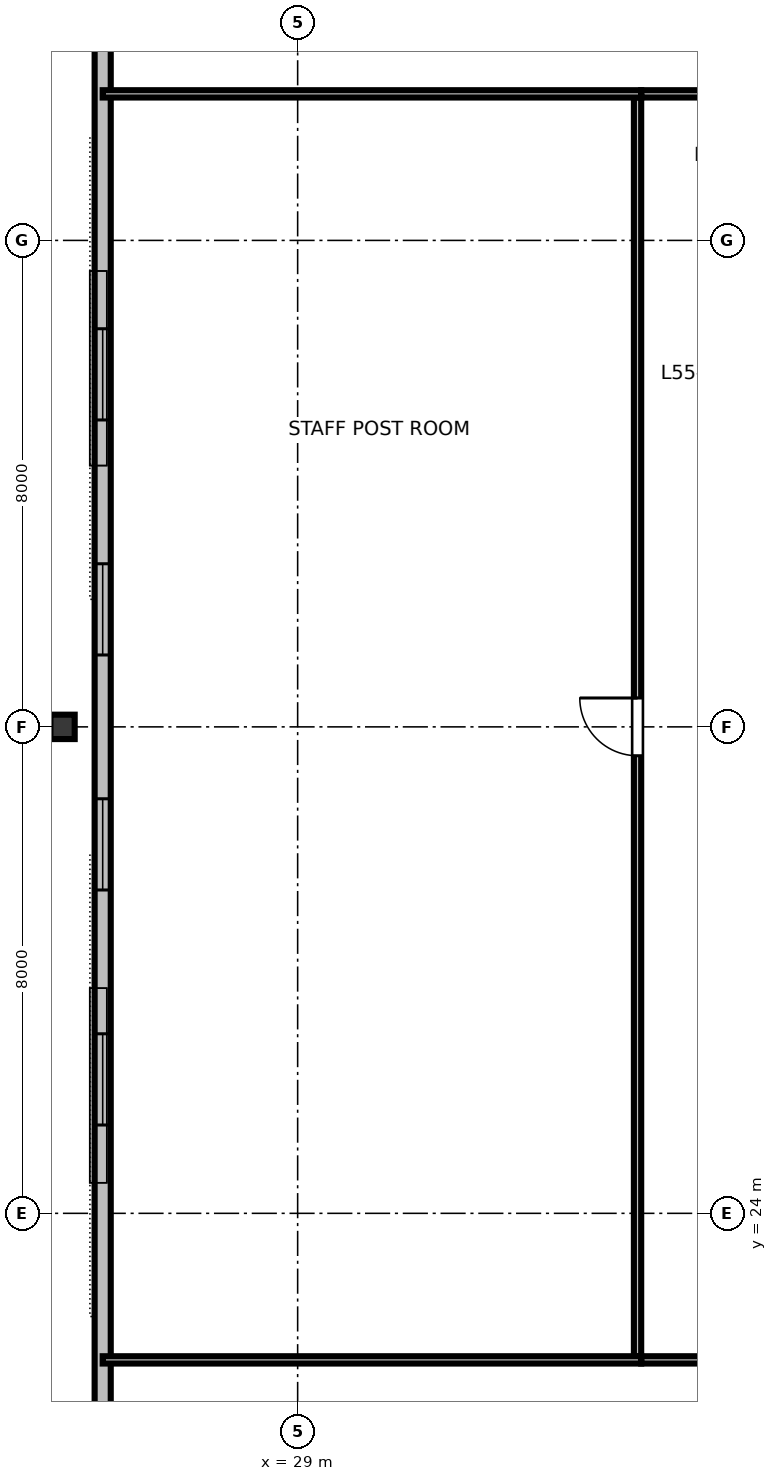
"""IFC4 building model, lengths in metres.
Left out: names, types, materials, properties, quantities, classifications, styles, units other than length and angle.
Written with IfcOpenShell. Run it as: python <this file> out.ifc"""

import sys

from ifc_helpers import new_model, si_unit, direction, frame, frame_2d, origin, origin_2d, place, context, subcontext, project, spatial, rectangle, i_section, extrude, element, fill, save


model = new_model("IFC4")
c1 = context("Model", 3, precision=1e-05, world=origin(), true_north=direction((0.0, 1.0)))
c2 = subcontext(c1, "Body", "Model", "MODEL_VIEW")
j1 = project(units=[si_unit("LENGTHUNIT", "METRE"), si_unit("PLANEANGLEUNIT", "RADIAN")], contexts=[c1])
p1 = place(None, origin())
s1 = spatial("IfcSite", under=j1, at=p1, CompositionType="ELEMENT")
p2 = place(p1, origin())
s2 = spatial("IfcBuilding", under=s1, at=p2, CompositionType="ELEMENT")
p3 = place(p2, frame((0.0, 0.0, 209.4)))
s3 = spatial("IfcBuildingStorey", under=s2, at=p3, CompositionType="ELEMENT", Elevation=209.4)
p4 = place(p3, frame((25.134, 32.0, 0.0), z_axis=(0.0, 0.0, 1.0), x_axis=(0.0, 1.0, 0.0)))
e1 = element("IfcColumn", 1, at=p4, inside=s3, PredefinedType="COLUMN", context=c2, shape_type="SweptSolid", body=[
    extrude(i_section(OverallWidth=0.401, OverallDepth=0.399, WebThickness=0.025, FlangeThickness=0.04, FilletRadius=0.025, at=origin_2d()), origin(), (0.0, 0.0, 1.0), 3.373),
])
p5 = place(p3, frame((25.794, 44.695, 0.0), z_axis=(0.0, 0.0, 1.0), x_axis=(0.0, -1.0, 0.0)))
e2 = element("IfcWall", 2, at=p5, inside=s3, PredefinedType="STANDARD", context=c2, shape_type="SweptSolid", body=[
    extrude(rectangle(XDim=25.389, YDim=0.265, at=frame_2d((12.695, 0.0))), origin(), (0.0, 0.0, 1.0), 3.375),
])
p6 = place(p5, frame((6.147, 0.0, 0.85)))
e3 = element("IfcOpeningElement", 3, at=p6, cuts=e2, PredefinedType="OPENING", context=c2, shape_type="SweptSolid", body=[
    extrude(rectangle(XDim=1.5, YDim=1.85, at=frame_2d((0.75, 0.925))), frame((0.0, 0.142, 0.0), z_axis=(0.0, -1.0, 0.0), x_axis=(1.0, 0.0, 0.0)), (0.0, 0.0, 1.0), 0.285),
])
p7 = place(p5, frame((10.012, 0.0, 0.85)))
e4 = element("IfcOpeningElement", 4, at=p7, cuts=e2, PredefinedType="OPENING", context=c2, shape_type="SweptSolid", body=[
    extrude(rectangle(XDim=1.5, YDim=1.85, at=frame_2d((0.75, 0.925))), frame((0.0, 0.142, 0.0), z_axis=(0.0, -1.0, 0.0), x_axis=(1.0, 0.0, 0.0)), (0.0, 0.0, 1.0), 0.285),
])
p8 = place(p5, frame((13.877, 0.0, 0.85)))
e5 = element("IfcOpeningElement", 5, at=p8, cuts=e2, PredefinedType="OPENING", context=c2, shape_type="SweptSolid", body=[
    extrude(rectangle(XDim=1.5, YDim=1.85, at=frame_2d((0.75, 0.925))), frame((0.0, 0.142, 0.0), z_axis=(0.0, -1.0, 0.0), x_axis=(1.0, 0.0, 0.0)), (0.0, 0.0, 1.0), 0.285),
])
p9 = place(p5, frame((17.742, 0.0, 0.85)))
e6 = element("IfcOpeningElement", 6, at=p9, cuts=e2, PredefinedType="OPENING", context=c2, shape_type="SweptSolid", body=[
    extrude(rectangle(XDim=1.5, YDim=1.85, at=frame_2d((0.75, 0.925))), frame((0.0, 0.142, 0.0), z_axis=(0.0, -1.0, 0.0), x_axis=(1.0, 0.0, 0.0)), (0.0, 0.0, 1.0), 0.285),
])
p10 = place(p3, frame((34.65, 21.59, 0.0), z_axis=(0.0, 0.0, 1.0), x_axis=(1.0, 0.0, 0.0)))
e7 = element("IfcWall", 7, at=p10, inside=s3, PredefinedType="PARTITIONING", context=c2, shape_type="SweptSolid", body=[
    extrude(rectangle(XDim=10.33, YDim=0.12, at=frame_2d((5.165, 0.0))), origin(), (0.0, 0.0, 1.0), 2.655),
])
p11 = place(p10, frame((2.69, 0.0, 0.0)))
e8 = element("IfcOpeningElement", 8, at=p11, cuts=e7, PredefinedType="OPENING", context=c2, shape_type="SweptSolid", body=[
    extrude(rectangle(XDim=0.95, YDim=2.15, at=frame_2d((0.475, 1.075))), frame((0.0, 0.07, 0.0), z_axis=(0.0, -1.0, 0.0), x_axis=(1.0, 0.0, 0.0)), (0.0, 0.0, 1.0), 0.14),
])
p12 = place(p10, frame((7.393, 0.0, 0.0)))
e9 = element("IfcOpeningElement", 9, at=p12, cuts=e7, PredefinedType="OPENING", context=c2, shape_type="SweptSolid", body=[
    extrude(rectangle(XDim=0.95, YDim=2.15, at=frame_2d((0.475, 1.075))), frame((0.0, 0.07, 0.0), z_axis=(0.0, -1.0, 0.0), x_axis=(1.0, 0.0, 0.0)), (0.0, 0.0, 1.0), 0.14),
])
p13 = place(p3, frame((34.65, 42.41, 0.0), z_axis=(0.0, 0.0, 1.0), x_axis=(1.0, 0.0, 0.0)))
e10 = element("IfcWall", 10, at=p13, inside=s3, PredefinedType="PARTITIONING", context=c2, shape_type="SweptSolid", body=[
    extrude(rectangle(XDim=10.33, YDim=0.12, at=frame_2d((5.165, 0.0))), origin(), (0.0, 0.0, 1.0), 2.655),
])
p14 = place(p13, frame((3.674, 0.0, 0.0)))
e11 = element("IfcOpeningElement", 11, at=p14, cuts=e10, PredefinedType="OPENING", context=c2, shape_type="SweptSolid", body=[
    extrude(rectangle(XDim=0.95, YDim=2.15, at=frame_2d((0.475, 1.075))), frame((0.0, 0.07, 0.0), z_axis=(0.0, -1.0, 0.0), x_axis=(1.0, 0.0, 0.0)), (0.0, 0.0, 1.0), 0.14),
])
p15 = place(p13, frame((8.769, 0.0, 0.0)))
e12 = element("IfcOpeningElement", 12, at=p15, cuts=e10, PredefinedType="OPENING", context=c2, shape_type="SweptSolid", body=[
    extrude(rectangle(XDim=0.95, YDim=2.15, at=frame_2d((0.475, 1.075))), frame((0.0, 0.07, 0.0), z_axis=(0.0, -1.0, 0.0), x_axis=(1.0, 0.0, 0.0)), (0.0, 0.0, 1.0), 0.14),
])
p16 = place(p3, frame((34.59, 21.65, 0.0), z_axis=(0.0, 0.0, 1.0), x_axis=(0.0, 1.0, 0.0)))
e13 = element("IfcWall", 13, at=p16, inside=s3, PredefinedType="PARTITIONING", context=c2, shape_type="SweptSolid", body=[
    extrude(rectangle(XDim=20.7, YDim=0.12, at=frame_2d((10.35, 0.0))), origin(), (0.0, 0.0, 1.0), 2.655),
])
p17 = place(p16, frame((9.875, 0.0, 0.0)))
e14 = element("IfcOpeningElement", 14, at=p17, cuts=e13, PredefinedType="OPENING", context=c2, shape_type="SweptSolid", body=[
    extrude(rectangle(XDim=0.95, YDim=2.15, at=frame_2d((0.475, 1.075))), frame((0.0, 0.07, 0.0), z_axis=(0.0, -1.0, 0.0), x_axis=(1.0, 0.0, 0.0)), (0.0, 0.0, 1.0), 0.14),
])
for number, where, z_axis, x_axis in (
    (15, (34.65, 21.59, 0.0), (0.0, 0.0, 1.0), (-1.0, 0.0, 0.0)),
    (16, (34.65, 42.41, 0.0), (0.0, 0.0, 1.0), (-1.0, 0.0, 0.0)),
):
    element("IfcWall", number, at=place(p3, frame(where, z_axis=z_axis, x_axis=x_axis)), inside=s3, PredefinedType="PARTITIONING", context=c2, shape_type="SweptSolid", body=[
        extrude(rectangle(XDim=8.856, YDim=0.12, at=frame_2d((4.428, 0.0))), origin(), (0.0, 0.0, 1.0), 2.655),
    ])
p18 = place(p6, origin())
e17 = element("IfcWindow", 17, at=p18, inside=s3, PartitioningType="SINGLE_PANEL", PredefinedType="WINDOW", context=c2, shape_type="SweptSolid", body=[
    extrude(rectangle(XDim=1.5, YDim=1.85, at=frame_2d((0.75, 0.925))), frame((0.0, 0.03, 0.0), z_axis=(0.0, -1.0, 0.0), x_axis=(1.0, 0.0, 0.0)), (0.0, 0.0, 1.0), 0.06),
])
fill(e3, e17)
p19 = place(p7, origin())
e18 = element("IfcWindow", 18, at=p19, inside=s3, PartitioningType="SINGLE_PANEL", PredefinedType="WINDOW", context=c2, shape_type="SweptSolid", body=[
    extrude(rectangle(XDim=1.5, YDim=1.85, at=frame_2d((0.75, 0.925))), frame((0.0, 0.03, 0.0), z_axis=(0.0, -1.0, 0.0), x_axis=(1.0, 0.0, 0.0)), (0.0, 0.0, 1.0), 0.06),
])
fill(e4, e18)
p20 = place(p8, origin())
e19 = element("IfcWindow", 19, at=p20, inside=s3, PartitioningType="SINGLE_PANEL", PredefinedType="WINDOW", context=c2, shape_type="SweptSolid", body=[
    extrude(rectangle(XDim=1.5, YDim=1.85, at=frame_2d((0.75, 0.925))), frame((0.0, 0.03, 0.0), z_axis=(0.0, -1.0, 0.0), x_axis=(1.0, 0.0, 0.0)), (0.0, 0.0, 1.0), 0.06),
])
fill(e5, e19)
p21 = place(p9, origin())
e20 = element("IfcWindow", 20, at=p21, inside=s3, PartitioningType="SINGLE_PANEL", PredefinedType="WINDOW", context=c2, shape_type="SweptSolid", body=[
    extrude(rectangle(XDim=1.5, YDim=1.85, at=frame_2d((0.75, 0.925))), frame((0.0, 0.03, 0.0), z_axis=(0.0, -1.0, 0.0), x_axis=(1.0, 0.0, 0.0)), (0.0, 0.0, 1.0), 0.06),
])
fill(e6, e20)
p22 = place(p17, origin())
e21 = element("IfcDoor", 21, at=p22, inside=s3, OperationType="SINGLE_SWING_RIGHT", PredefinedType="DOOR", context=c2, shape_type="SweptSolid", body=[
    extrude(rectangle(XDim=0.95, YDim=2.15, at=frame_2d((0.475, 1.075))), frame((0.0, 0.025, 0.0), z_axis=(0.0, -1.0, 0.0), x_axis=(1.0, 0.0, 0.0)), (0.0, 0.0, 1.0), 0.05),
])
fill(e14, e21)
save(model, sys.argv[1])
